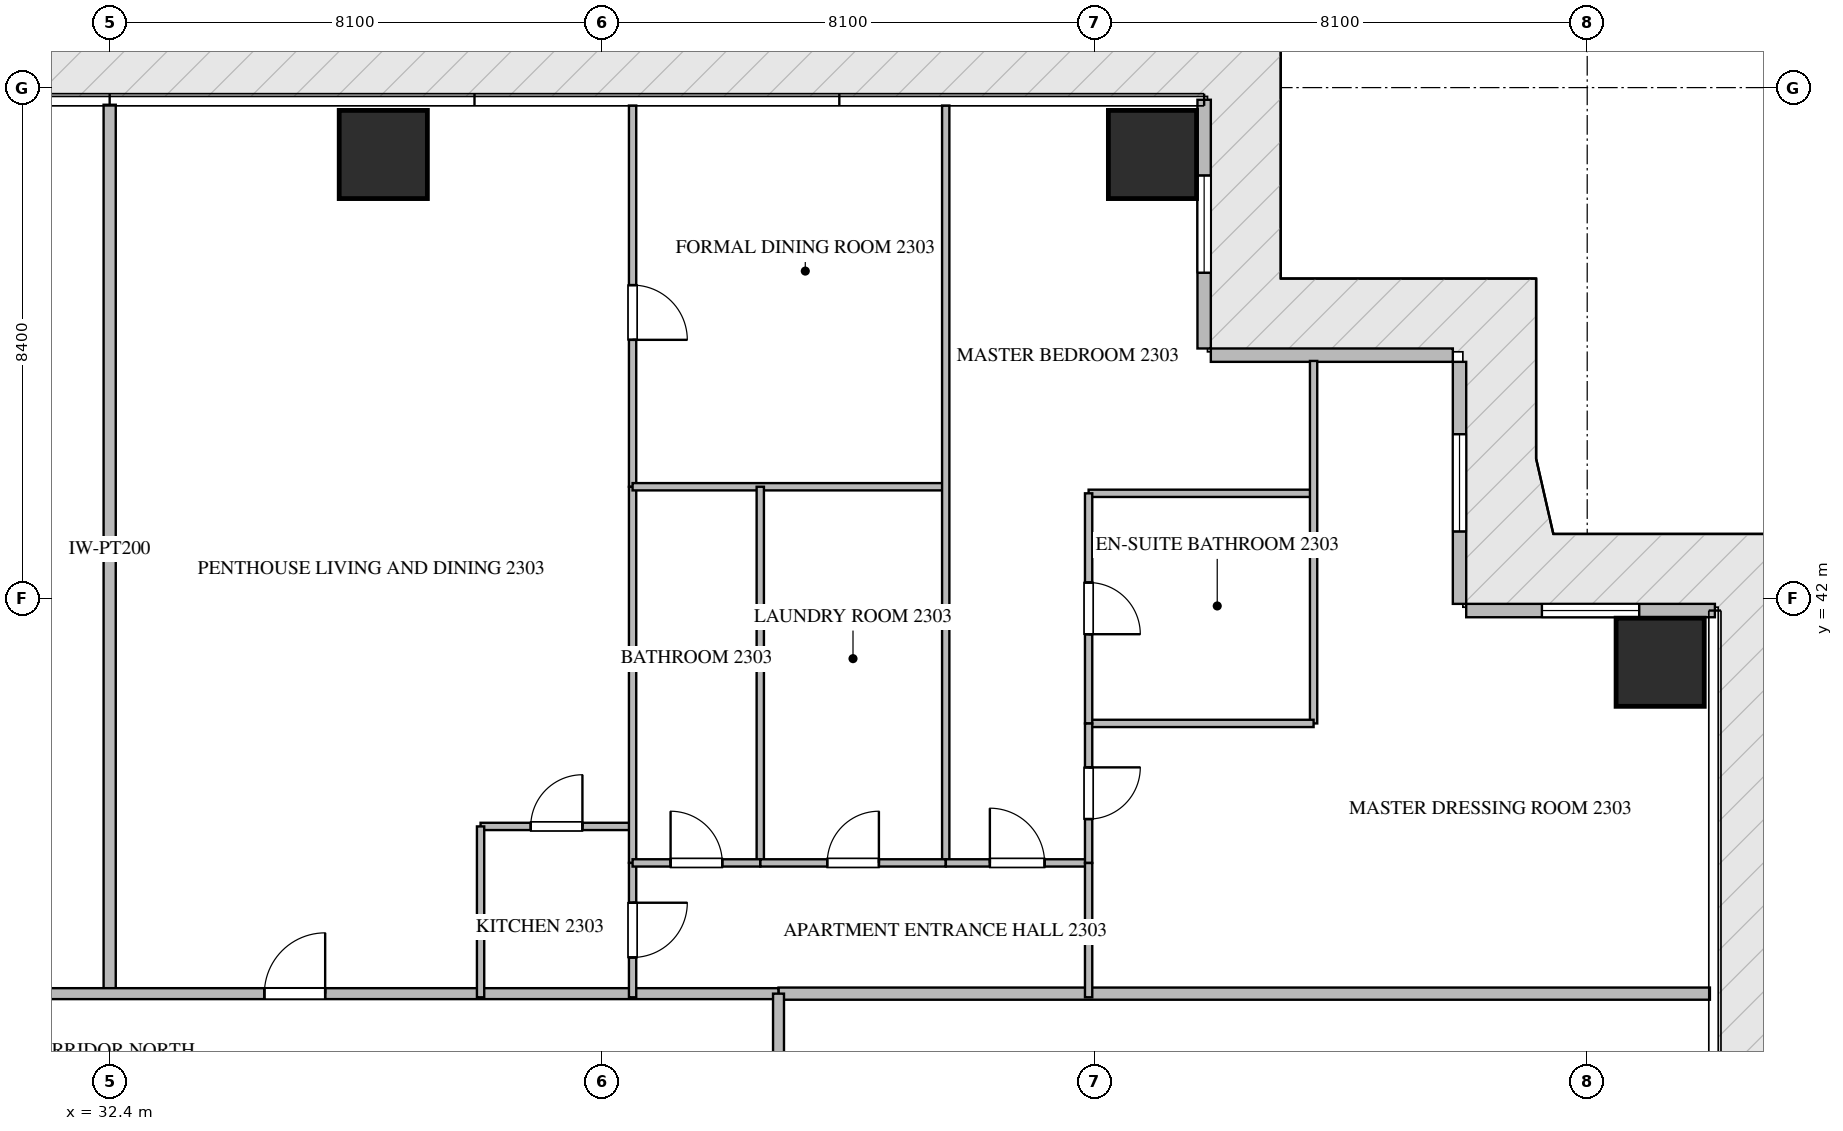
"""IFC4 building model, lengths in metres.
Left out: names, types, materials, properties, quantities, classifications, styles, units other than length and angle.
Written with IfcOpenShell. Run it as: python <this file> out.ifc"""

import sys

from ifc_helpers import new_model, si_unit, direction, frame, frame_2d, origin, origin_2d, place, context, subcontext, project, spatial, rectangle, extrude, source, transform, mapped, element, fill, save


model = new_model("IFC4")
c1 = context("Model", 3, precision=1e-05, world=origin(), true_north=direction((0.0, 1.0)))
c2 = subcontext(c1, "Body", "Model", "MODEL_VIEW")
j1 = project(units=[si_unit("LENGTHUNIT", "METRE"), si_unit("PLANEANGLEUNIT", "RADIAN")], contexts=[c1])
p1 = place(None, origin())
s1 = spatial("IfcSite", under=j1, at=p1, CompositionType="ELEMENT")
p2 = place(p1, origin())
s2 = spatial("IfcBuilding", under=s1, at=p2, CompositionType="ELEMENT")
p3 = place(p2, frame((0.0, 0.0, 94.2)))
s3 = spatial("IfcBuildingStorey", under=s2, at=p3, CompositionType="ELEMENT", Elevation=94.2)
m1 = source(origin(), c2, "Body", "SweptSolid", [
    extrude(rectangle(XDim=1.45, YDim=1.45, at=origin_2d()), origin(), (0.0, 0.0, 1.0), 3.75),
])
for number, where, z_axis, x_axis in (
    (1, (36.9, 49.3, -0.26), (0.0, 0.0, 1.0), (1.0, 0.0, 0.0)),
    (2, (49.55, 49.3, -0.26), (0.0, 0.0, 1.0), (1.0, 0.0, 0.0)),
    (3, (57.9, 40.95, -0.26), (0.0, 0.0, 1.0), (1.0, 0.0, 0.0)),
):
    element("IfcColumn", number, at=place(p3, frame(where, z_axis=z_axis, x_axis=x_axis)), inside=s3, PredefinedType="COLUMN", context=c2, shape_type="MappedRepresentation", body=[
        mapped(m1, transform((0.0, 0.0, 0.0), scale=1.0)),
    ])
p4 = place(p3, frame((58.8, 41.8, 0.0), z_axis=(0.0, 0.0, 1.0), x_axis=(-1.0, 0.0, 0.0)))
e4 = element("IfcWall", 4, at=p4, inside=s3, PredefinedType="ELEMENTEDWALL", context=c2, shape_type="SweptSolid", body=[
    extrude(rectangle(XDim=4.09, YDim=0.22, at=frame_2d((2.045, 0.0))), origin(), (0.0, 0.0, 1.0), 3.475),
])
p5 = place(p4, frame((1.245, 0.0, 0.65)))
e5 = element("IfcOpeningElement", 5, at=p5, cuts=e4, PredefinedType="OPENING", context=c2, shape_type="SweptSolid", body=[
    extrude(rectangle(XDim=1.6, YDim=2.1, at=frame_2d((0.8, 1.05))), frame((0.0, 0.12, 0.0), z_axis=(0.0, -1.0, 0.0), x_axis=(1.0, 0.0, 0.0)), (0.0, 0.0, 1.0), 0.24),
])
p6 = place(p3, frame((54.6, 41.91, 0.0), z_axis=(0.0, 0.0, 1.0), x_axis=(0.0, 1.0, 0.0)))
e6 = element("IfcWall", 6, at=p6, inside=s3, PredefinedType="ELEMENTEDWALL", context=c2, shape_type="SweptSolid", body=[
    extrude(rectangle(XDim=3.98, YDim=0.22, at=frame_2d((1.99, 0.0))), origin(), (0.0, 0.0, 1.0), 3.475),
])
p7 = place(p6, frame((1.19, 0.0, 0.65)))
e7 = element("IfcOpeningElement", 7, at=p7, cuts=e6, PredefinedType="OPENING", context=c2, shape_type="SweptSolid", body=[
    extrude(rectangle(XDim=1.6, YDim=2.1, at=frame_2d((0.8, 1.05))), frame((0.0, 0.12, 0.0), z_axis=(0.0, -1.0, 0.0), x_axis=(1.0, 0.0, 0.0)), (0.0, 0.0, 1.0), 0.24),
])
p8 = place(p3, frame((54.49, 46.0, 0.0), z_axis=(0.0, 0.0, 1.0), x_axis=(-1.0, 0.0, 0.0)))
e8 = element("IfcWall", 8, at=p8, inside=s3, PredefinedType="ELEMENTEDWALL", context=c2, shape_type="SweptSolid", body=[
    extrude(rectangle(XDim=3.98, YDim=0.22, at=frame_2d((1.99, 0.0))), origin(), (0.0, 0.0, 1.0), 3.475),
])
p9 = place(p3, frame((50.4, 46.11, 0.0), z_axis=(0.0, 0.0, 1.0), x_axis=(0.0, 1.0, 0.0)))
e9 = element("IfcWall", 9, at=p9, inside=s3, PredefinedType="ELEMENTEDWALL", context=c2, shape_type="SweptSolid", body=[
    extrude(rectangle(XDim=4.09, YDim=0.22, at=frame_2d((2.045, 0.0))), origin(), (0.0, 0.0, 1.0), 3.475),
])
p10 = place(p9, frame((1.245, 0.0, 0.65)))
e10 = element("IfcOpeningElement", 10, at=p10, cuts=e9, PredefinedType="OPENING", context=c2, shape_type="SweptSolid", body=[
    extrude(rectangle(XDim=1.6, YDim=2.1, at=frame_2d((0.8, 1.05))), frame((0.0, 0.12, 0.0), z_axis=(0.0, -1.0, 0.0), x_axis=(1.0, 0.0, 0.0)), (0.0, 0.0, 1.0), 0.24),
])
p11 = place(p3, frame((32.4, 35.5, 0.0), z_axis=(0.0, 0.0, 1.0), x_axis=(0.0, 1.0, 0.0)))
e11 = element("IfcWall", 11, at=p11, inside=s3, PredefinedType="PARTITIONING", context=c2, shape_type="SweptSolid", body=[
    extrude(rectangle(XDim=14.618, YDim=0.2, at=frame_2d((7.309, 0.0))), origin(), (0.0, 0.0, 1.0), 3.49),
])
p12 = place(p3, frame((43.4, 35.5, 0.0), z_axis=(0.0, 0.0, 1.0), x_axis=(1.0, 0.0, 0.0)))
e12 = element("IfcWall", 12, at=p12, inside=s3, PredefinedType="PARTITIONING", context=c2, shape_type="SweptSolid", body=[
    extrude(rectangle(XDim=15.318, YDim=0.2, at=frame_2d((7.659, 0.0))), origin(), (0.0, 0.0, 1.0), 3.49),
])
p13 = place(p3, frame((21.402, 35.5, 0.0), z_axis=(0.0, 0.0, 1.0), x_axis=(1.0, 0.0, 0.0)))
e13 = element("IfcWall", 13, at=p13, inside=s3, PredefinedType="PARTITIONING", context=c2, shape_type="SweptSolid", body=[
    extrude(rectangle(XDim=21.996, YDim=0.18, at=frame_2d((10.998, 0.0))), origin(), (0.0, 0.0, 1.0), 3.49),
])
p14 = place(p13, frame((7.454, 0.0, 0.0)))
e14 = element("IfcOpeningElement", 14, at=p14, cuts=e13, PredefinedType="OPENING", context=c2, shape_type="SweptSolid", body=[
    extrude(rectangle(XDim=1.0, YDim=2.15, at=frame_2d((0.5, 1.075))), frame((0.0, 0.1, 0.0), z_axis=(0.0, -1.0, 0.0), x_axis=(1.0, 0.0, 0.0)), (0.0, 0.0, 1.0), 0.2),
])
p15 = place(p13, frame((13.542, 0.0, 0.0)))
e15 = element("IfcOpeningElement", 15, at=p15, cuts=e13, PredefinedType="OPENING", context=c2, shape_type="SweptSolid", body=[
    extrude(rectangle(XDim=1.0, YDim=2.15, at=frame_2d((0.5, 1.075))), frame((0.0, 0.1, 0.0), z_axis=(0.0, -1.0, 0.0), x_axis=(1.0, 0.0, 0.0)), (0.0, 0.0, 1.0), 0.2),
])
p16 = place(p3, frame((43.4, 14.9, 0.0), z_axis=(0.0, 0.0, 1.0), x_axis=(0.0, 1.0, 0.0)))
e16 = element("IfcWall", 16, at=p16, inside=s3, PredefinedType="PARTITIONING", context=c2, shape_type="SweptSolid", body=[
    extrude(rectangle(XDim=20.6, YDim=0.18, at=frame_2d((10.3, 0.0))), origin(), (0.0, 0.0, 1.0), 3.49),
])
p17 = place(p16, frame((17.64, 0.0, 0.0)))
e17 = element("IfcOpeningElement", 17, at=p17, cuts=e16, PredefinedType="OPENING", context=c2, shape_type="SweptSolid", body=[
    extrude(rectangle(XDim=1.0, YDim=2.15, at=frame_2d((0.5, 1.075))), frame((0.0, 0.1, 0.0), z_axis=(0.0, -1.0, 0.0), x_axis=(1.0, 0.0, 0.0)), (0.0, 0.0, 1.0), 0.2),
])
p18 = place(p3, frame((38.5, 38.25, 0.0), z_axis=(0.0, 0.0, 1.0), x_axis=(1.0, 0.0, 0.0)))
e18 = element("IfcWall", 18, at=p18, inside=s3, PredefinedType="PARTITIONING", context=c2, shape_type="SweptSolid", body=[
    extrude(rectangle(XDim=2.5, YDim=0.12, at=frame_2d((1.25, 0.0))), origin(), (0.0, 0.0, 1.0), 3.49),
])
p19 = place(p18, frame((0.825, 0.0, 0.0)))
e19 = element("IfcOpeningElement", 19, at=p19, cuts=e18, PredefinedType="OPENING", context=c2, shape_type="SweptSolid", body=[
    extrude(rectangle(XDim=0.85, YDim=2.1, at=frame_2d((0.425, 1.05))), frame((0.0, 0.07, 0.0), z_axis=(0.0, -1.0, 0.0), x_axis=(1.0, 0.0, 0.0)), (0.0, 0.0, 1.0), 0.14),
])
p20 = place(p3, frame((38.5, 38.25, 0.0), z_axis=(0.0, 0.0, 1.0), x_axis=(0.0, -1.0, 0.0)))
e20 = element("IfcWall", 20, at=p20, inside=s3, PredefinedType="PARTITIONING", context=c2, shape_type="SweptSolid", body=[
    extrude(rectangle(XDim=2.81, YDim=0.12, at=frame_2d((1.405, 0.0))), origin(), (0.0, 0.0, 1.0), 3.49),
])
p21 = place(p3, frame((41.0, 37.65, 0.0), z_axis=(0.0, 0.0, 1.0), x_axis=(0.0, -1.0, 0.0)))
e21 = element("IfcWall", 21, at=p21, inside=s3, PredefinedType="PARTITIONING", context=c2, shape_type="SweptSolid", body=[
    extrude(rectangle(XDim=2.21, YDim=0.12, at=frame_2d((1.105, 0.0))), origin(), (0.0, 0.0, 1.0), 3.49),
])
p22 = place(p21, frame((0.655, 0.0, 0.0)))
e22 = element("IfcOpeningElement", 22, at=p22, cuts=e21, PredefinedType="OPENING", context=c2, shape_type="SweptSolid", body=[
    extrude(rectangle(XDim=0.9, YDim=2.1, at=frame_2d((0.45, 1.05))), frame((0.0, 0.07, 0.0), z_axis=(0.0, -1.0, 0.0), x_axis=(1.0, 0.0, 0.0)), (0.0, 0.0, 1.0), 0.14),
])
p23 = place(p3, frame((41.0, 50.105, 0.0), z_axis=(0.0, 0.0, 1.0), x_axis=(0.0, -1.0, 0.0)))
e23 = element("IfcWall", 23, at=p23, inside=s3, PredefinedType="PARTITIONING", context=c2, shape_type="SweptSolid", body=[
    extrude(rectangle(XDim=6.269, YDim=0.12, at=frame_2d((3.135, 0.0))), origin(), (0.0, 0.0, 1.0), 3.49),
])
p24 = place(p23, frame((2.953, 0.0, 0.0)))
e24 = element("IfcOpeningElement", 24, at=p24, cuts=e23, PredefinedType="OPENING", context=c2, shape_type="SweptSolid", body=[
    extrude(rectangle(XDim=0.9, YDim=2.1, at=frame_2d((0.45, 1.05))), frame((0.0, 0.07, 0.0), z_axis=(0.0, -1.0, 0.0), x_axis=(1.0, 0.0, 0.0)), (0.0, 0.0, 1.0), 0.14),
])
p25 = place(p3, frame((41.0, 43.834, 0.0), z_axis=(0.0, 0.0, 1.0), x_axis=(0.0, -1.0, 0.0)))
e25 = element("IfcWall", 25, at=p25, inside=s3, PredefinedType="PARTITIONING", context=c2, shape_type="SweptSolid", body=[
    extrude(rectangle(XDim=6.182, YDim=0.12, at=frame_2d((3.091, 0.0))), origin(), (0.0, 0.0, 1.0), 3.49),
])
p26 = place(p3, frame((41.0, 43.836, 0.0), z_axis=(0.0, 0.0, 1.0), x_axis=(1.0, 0.0, 0.0)))
e26 = element("IfcWall", 26, at=p26, inside=s3, PredefinedType="PARTITIONING", context=c2, shape_type="SweptSolid", body=[
    extrude(rectangle(XDim=5.15, YDim=0.12, at=frame_2d((2.575, 0.0))), origin(), (0.0, 0.0, 1.0), 3.49),
])
p27 = place(p3, frame((46.15, 50.105, 0.0), z_axis=(0.0, 0.0, 1.0), x_axis=(0.0, -1.0, 0.0)))
e27 = element("IfcWall", 27, at=p27, inside=s3, PredefinedType="PARTITIONING", context=c2, shape_type="SweptSolid", body=[
    extrude(rectangle(XDim=12.455, YDim=0.12, at=frame_2d((6.228, 0.0))), origin(), (0.0, 0.0, 1.0), 3.49),
])
p28 = place(p3, frame((43.1, 43.836, 0.0), z_axis=(0.0, 0.0, 1.0), x_axis=(0.0, -1.0, 0.0)))
e28 = element("IfcWall", 28, at=p28, inside=s3, PredefinedType="PARTITIONING", context=c2, shape_type="SweptSolid", body=[
    extrude(rectangle(XDim=6.186, YDim=0.12, at=frame_2d((3.093, 0.0))), origin(), (0.0, 0.0, 1.0), 3.49),
])
p29 = place(p3, frame((41.0, 37.65, 0.0), z_axis=(0.0, 0.0, 1.0), x_axis=(1.0, 0.0, 0.0)))
e29 = element("IfcWall", 29, at=p29, inside=s3, PredefinedType="PARTITIONING", context=c2, shape_type="SweptSolid", body=[
    extrude(rectangle(XDim=2.1, YDim=0.12, at=frame_2d((1.05, 0.0))), origin(), (0.0, 0.0, 1.0), 3.49),
])
p30 = place(p29, frame((0.625, 0.0, 0.0)))
e30 = element("IfcOpeningElement", 30, at=p30, cuts=e29, PredefinedType="OPENING", context=c2, shape_type="SweptSolid", body=[
    extrude(rectangle(XDim=0.85, YDim=2.1, at=frame_2d((0.425, 1.05))), frame((0.0, 0.07, 0.0), z_axis=(0.0, -1.0, 0.0), x_axis=(1.0, 0.0, 0.0)), (0.0, 0.0, 1.0), 0.14),
])
p31 = place(p3, frame((43.102, 37.65, 0.0), z_axis=(0.0, 0.0, 1.0), x_axis=(1.0, 0.0, 0.0)))
e31 = element("IfcWall", 31, at=p31, inside=s3, PredefinedType="PARTITIONING", context=c2, shape_type="SweptSolid", body=[
    extrude(rectangle(XDim=3.048, YDim=0.12, at=frame_2d((1.524, 0.0))), origin(), (0.0, 0.0, 1.0), 3.49),
])
p32 = place(p31, frame((1.099, 0.0, 0.0)))
e32 = element("IfcOpeningElement", 32, at=p32, cuts=e31, PredefinedType="OPENING", context=c2, shape_type="SweptSolid", body=[
    extrude(rectangle(XDim=0.85, YDim=2.1, at=frame_2d((0.425, 1.05))), frame((0.0, 0.07, 0.0), z_axis=(0.0, -1.0, 0.0), x_axis=(1.0, 0.0, 0.0)), (0.0, 0.0, 1.0), 0.14),
])
p33 = place(p3, frame((46.152, 37.65, 0.0), z_axis=(0.0, 0.0, 1.0), x_axis=(1.0, 0.0, 0.0)))
e33 = element("IfcWall", 33, at=p33, inside=s3, PredefinedType="PARTITIONING", context=c2, shape_type="SweptSolid", body=[
    extrude(rectangle(XDim=2.348, YDim=0.12, at=frame_2d((1.174, 0.0))), origin(), (0.0, 0.0, 1.0), 3.49),
])
p34 = place(p33, frame((0.724, 0.0, 0.0)))
e34 = element("IfcOpeningElement", 34, at=p34, cuts=e33, PredefinedType="OPENING", context=c2, shape_type="SweptSolid", body=[
    extrude(rectangle(XDim=0.9, YDim=2.1, at=frame_2d((0.45, 1.05))), frame((0.0, 0.07, 0.0), z_axis=(0.0, -1.0, 0.0), x_axis=(1.0, 0.0, 0.0)), (0.0, 0.0, 1.0), 0.14),
])
p35 = place(p3, frame((48.5, 43.728, 0.0), z_axis=(0.0, 0.0, 1.0), x_axis=(1.0, 0.0, 0.0)))
e35 = element("IfcWall", 35, at=p35, inside=s3, PredefinedType="PARTITIONING", context=c2, shape_type="SweptSolid", body=[
    extrude(rectangle(XDim=3.7, YDim=0.12, at=frame_2d((1.85, 0.0))), origin(), (0.0, 0.0, 1.0), 3.49),
])
p36 = place(p3, frame((52.2, 45.905, 0.0), z_axis=(0.0, 0.0, 1.0), x_axis=(0.0, -1.0, 0.0)))
e36 = element("IfcWall", 36, at=p36, inside=s3, PredefinedType="PARTITIONING", context=c2, shape_type="SweptSolid", body=[
    extrude(rectangle(XDim=5.961, YDim=0.12, at=frame_2d((2.98, 0.0))), origin(), (0.0, 0.0, 1.0), 3.49),
])
p37 = place(p3, frame((48.5, 39.944, 0.0), z_axis=(0.0, 0.0, 1.0), x_axis=(1.0, 0.0, 0.0)))
e37 = element("IfcWall", 37, at=p37, inside=s3, PredefinedType="PARTITIONING", context=c2, shape_type="SweptSolid", body=[
    extrude(rectangle(XDim=3.7, YDim=0.12, at=frame_2d((1.85, 0.0))), origin(), (0.0, 0.0, 1.0), 3.49),
])
p38 = place(p3, frame((48.5, 43.728, 0.0), z_axis=(0.0, 0.0, 1.0), x_axis=(0.0, -1.0, 0.0)))
e38 = element("IfcWall", 38, at=p38, inside=s3, PredefinedType="PARTITIONING", context=c2, shape_type="SweptSolid", body=[
    extrude(rectangle(XDim=3.784, YDim=0.12, at=frame_2d((1.892, 0.0))), origin(), (0.0, 0.0, 1.0), 3.49),
])
p39 = place(p38, frame((1.467, 0.0, 0.0)))
e39 = element("IfcOpeningElement", 39, at=p39, cuts=e38, PredefinedType="OPENING", context=c2, shape_type="SweptSolid", body=[
    extrude(rectangle(XDim=0.85, YDim=2.1, at=frame_2d((0.425, 1.05))), frame((0.0, 0.07, 0.0), z_axis=(0.0, -1.0, 0.0), x_axis=(1.0, 0.0, 0.0)), (0.0, 0.0, 1.0), 0.14),
])
p40 = place(p3, frame((48.5, 39.942, 0.0), z_axis=(0.0, 0.0, 1.0), x_axis=(0.0, -1.0, 0.0)))
e40 = element("IfcWall", 40, at=p40, inside=s3, PredefinedType="PARTITIONING", context=c2, shape_type="SweptSolid", body=[
    extrude(rectangle(XDim=2.292, YDim=0.12, at=frame_2d((1.146, 0.0))), origin(), (0.0, 0.0, 1.0), 3.49),
])
p41 = place(p40, frame((0.721, 0.0, 0.0)))
e41 = element("IfcOpeningElement", 41, at=p41, cuts=e40, PredefinedType="OPENING", context=c2, shape_type="SweptSolid", body=[
    extrude(rectangle(XDim=0.85, YDim=2.1, at=frame_2d((0.425, 1.05))), frame((0.0, 0.07, 0.0), z_axis=(0.0, -1.0, 0.0), x_axis=(1.0, 0.0, 0.0)), (0.0, 0.0, 1.0), 0.14),
])
p42 = place(p3, frame((48.5, 37.648, 0.0), z_axis=(0.0, 0.0, 1.0), x_axis=(0.0, -1.0, 0.0)))
e42 = element("IfcWall", 42, at=p42, inside=s3, PredefinedType="PARTITIONING", context=c2, shape_type="SweptSolid", body=[
    extrude(rectangle(XDim=2.208, YDim=0.12, at=frame_2d((1.104, 0.0))), origin(), (0.0, 0.0, 1.0), 3.49),
])
m2 = source(origin(), c2, "Body", "SweptSolid", [
    extrude(rectangle(XDim=1.6, YDim=2.1, at=frame_2d((0.8, 1.05))), frame((0.0, 0.03, 0.0), z_axis=(0.0, -1.0, 0.0), x_axis=(1.0, 0.0, 0.0)), (0.0, 0.0, 1.0), 0.06),
])
p43 = place(p5, origin())
e43 = element("IfcWindow", 43, at=p43, inside=s3, PartitioningType="SINGLE_PANEL", PredefinedType="WINDOW", context=c2, shape_type="MappedRepresentation", body=[
    mapped(m2, transform((0.0, 0.0, 0.0), scale=1.0)),
])
fill(e5, e43)
p44 = place(p7, origin())
e44 = element("IfcWindow", 44, at=p44, inside=s3, PartitioningType="SINGLE_PANEL", PredefinedType="WINDOW", context=c2, shape_type="MappedRepresentation", body=[
    mapped(m2, transform((0.0, 0.0, 0.0), scale=1.0)),
])
fill(e7, e44)
p45 = place(p10, origin())
e45 = element("IfcWindow", 45, at=p45, inside=s3, PartitioningType="SINGLE_PANEL", PredefinedType="WINDOW", context=c2, shape_type="MappedRepresentation", body=[
    mapped(m2, transform((0.0, 0.0, 0.0), scale=1.0)),
])
fill(e10, e45)
m3 = source(origin(), c2, "Body", "SweptSolid", [
    extrude(rectangle(XDim=1.0, YDim=2.15, at=frame_2d((0.5, 1.075))), frame((0.0, 0.025, 0.0), z_axis=(0.0, -1.0, 0.0), x_axis=(1.0, 0.0, 0.0)), (0.0, 0.0, 1.0), 0.05),
])
p46 = place(p15, origin())
e46 = element("IfcDoor", 46, at=p46, inside=s3, OperationType="SINGLE_SWING_RIGHT", PredefinedType="DOOR", context=c2, shape_type="MappedRepresentation", body=[
    mapped(m3, transform((0.0, 0.0, 0.0), scale=1.0)),
])
fill(e15, e46)
m4 = source(origin(), c2, "Body", "SweptSolid", [
    extrude(rectangle(XDim=0.85, YDim=2.1, at=frame_2d((0.425, 1.05))), frame((0.0, 0.025, 0.0), z_axis=(0.0, -1.0, 0.0), x_axis=(1.0, 0.0, 0.0)), (0.0, 0.0, 1.0), 0.05),
])
p47 = place(p19, origin())
e47 = element("IfcDoor", 47, at=p47, inside=s3, OperationType="SINGLE_SWING_RIGHT", PredefinedType="DOOR", context=c2, shape_type="MappedRepresentation", body=[
    mapped(m4, transform((0.0, 0.0, 0.0), scale=1.0)),
])
fill(e19, e47)
m5 = source(origin(), c2, "Body", "SweptSolid", [
    extrude(rectangle(XDim=0.9, YDim=2.1, at=frame_2d((0.45, 1.05))), frame((0.0, 0.025, 0.0), z_axis=(0.0, -1.0, 0.0), x_axis=(1.0, 0.0, 0.0)), (0.0, 0.0, 1.0), 0.05),
])
p48 = place(p22, origin())
e48 = element("IfcDoor", 48, at=p48, inside=s3, OperationType="SINGLE_SWING_LEFT", PredefinedType="DOOR", context=c2, shape_type="MappedRepresentation", body=[
    mapped(m5, transform((0.0, 0.0, 0.0), scale=1.0)),
])
fill(e22, e48)
p49 = place(p24, origin())
e49 = element("IfcDoor", 49, at=p49, inside=s3, OperationType="SINGLE_SWING_RIGHT", PredefinedType="DOOR", context=c2, shape_type="MappedRepresentation", body=[
    mapped(m5, transform((0.0, 0.0, 0.0), scale=1.0)),
])
fill(e24, e49)
p50 = place(p30, origin())
e50 = element("IfcDoor", 50, at=p50, inside=s3, OperationType="SINGLE_SWING_LEFT", PredefinedType="DOOR", context=c2, shape_type="MappedRepresentation", body=[
    mapped(m4, transform((0.0, 0.0, 0.0), scale=1.0)),
])
fill(e30, e50)
p51 = place(p32, origin())
e51 = element("IfcDoor", 51, at=p51, inside=s3, OperationType="SINGLE_SWING_RIGHT", PredefinedType="DOOR", context=c2, shape_type="MappedRepresentation", body=[
    mapped(m4, transform((0.0, 0.0, 0.0), scale=1.0)),
])
fill(e32, e51)
p52 = place(p34, origin())
e52 = element("IfcDoor", 52, at=p52, inside=s3, OperationType="SINGLE_SWING_LEFT", PredefinedType="DOOR", context=c2, shape_type="MappedRepresentation", body=[
    mapped(m5, transform((0.0, 0.0, 0.0), scale=1.0)),
])
fill(e34, e52)
p53 = place(p39, origin())
e53 = element("IfcDoor", 53, at=p53, inside=s3, OperationType="SINGLE_SWING_RIGHT", PredefinedType="DOOR", context=c2, shape_type="MappedRepresentation", body=[
    mapped(m4, transform((0.0, 0.0, 0.0), scale=1.0)),
])
fill(e39, e53)
p54 = place(p41, origin())
e54 = element("IfcDoor", 54, at=p54, inside=s3, OperationType="SINGLE_SWING_LEFT", PredefinedType="DOOR", context=c2, shape_type="MappedRepresentation", body=[
    mapped(m4, transform((0.0, 0.0, 0.0), scale=1.0)),
])
fill(e41, e54)
save(model, sys.argv[1])
